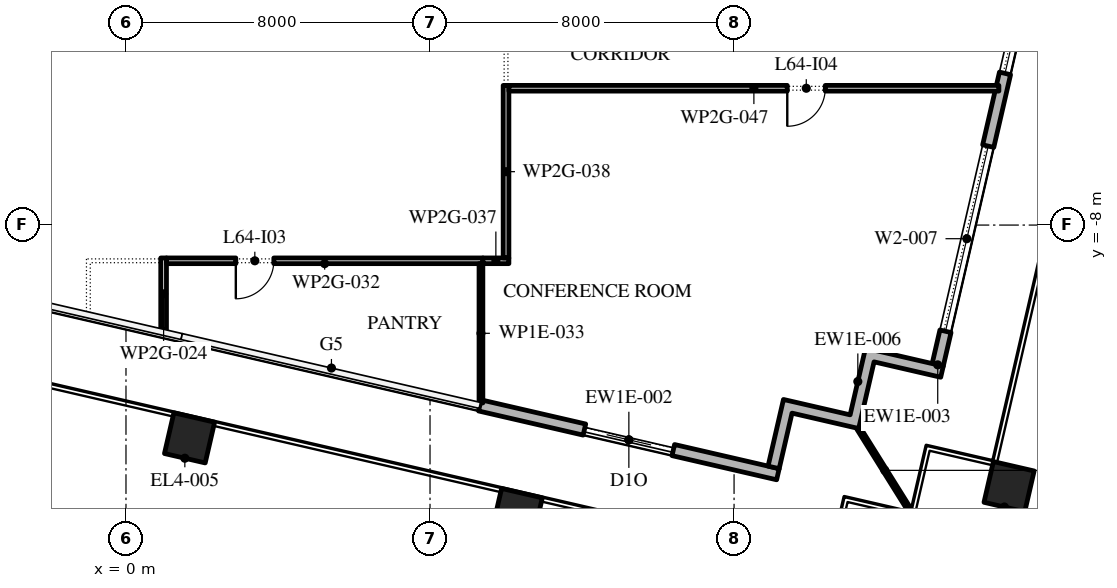
"""IFC4 building model, lengths in metres.
Left out: names, types, materials, properties, quantities, classifications, styles, units other than length and angle.
Written with IfcOpenShell. Run it as: python <this file> out.ifc"""

import sys

from ifc_helpers import new_model, si_unit, direction, frame, frame_2d, origin, origin_2d, place, context, subcontext, project, spatial, polyline, rectangle, outline, extrude, element, fill, save


model = new_model("IFC4")
c1 = context("Model", 3, precision=1e-05, world=origin(), true_north=direction((0.0, 1.0)))
c2 = subcontext(c1, "Body", "Model", "MODEL_VIEW")
j1 = project(units=[si_unit("LENGTHUNIT", "METRE"), si_unit("PLANEANGLEUNIT", "RADIAN")], contexts=[c1])
p1 = place(None, origin())
s1 = spatial("IfcSite", under=j1, at=p1, CompositionType="ELEMENT")
p2 = place(p1, origin())
s2 = spatial("IfcBuilding", under=s1, at=p2, CompositionType="ELEMENT")
p3 = place(p2, frame((0.0, 0.0, 293.4)))
s3 = spatial("IfcBuildingStorey", under=s2, at=p3, CompositionType="ELEMENT", Elevation=293.4)
for number, where, z_axis, x_axis in (
    (1, (1.672, -13.599, 0.0), (0.0, 0.0, 1.0), (0.974, -0.225, 0.0)),
    (2, (10.295, -15.59, 0.0), (0.0, 0.0, 1.0), (0.974, -0.225, 0.0)),
    (3, (23.236, -14.883, 0.0), (0.0, 0.0, 1.0), (0.974, -0.225, 0.0)),
):
    element("IfcColumn", number, at=place(p3, frame(where, z_axis=z_axis, x_axis=x_axis)), inside=s3, PredefinedType="COLUMN", context=c2, shape_type="SweptSolid", body=[
        extrude(rectangle(XDim=1.1, YDim=1.1, at=origin_2d()), origin(), (0.0, 0.0, 1.0), 4.2),
    ])
p4 = place(p3, frame((9.31, -12.745, 0.0), z_axis=(0.0, 0.0, 1.0), x_axis=(0.974372279954, -0.224941459176, 0.0)))
e4 = element("IfcWall", 4, at=p4, inside=s3, PredefinedType="STANDARD", context=c2, shape_type="SweptSolid", body=[
    extrude(rectangle(XDim=8.05, YDim=0.3, at=frame_2d((4.025, 0.0))), origin(), (0.0, 0.0, 1.0), 3.75),
])
p5 = place(p4, frame((2.825, 0.0, 0.0)))
e5 = element("IfcOpeningElement", 5, at=p5, cuts=e4, PredefinedType="OPENING", context=c2, shape_type="SweptSolid", body=[
    extrude(rectangle(XDim=2.4, YDim=2.95, at=frame_2d((1.2, 1.475))), frame((0.0, 0.16, 0.0), z_axis=(0.0, -1.0, 0.0), x_axis=(1.0, 0.0, 0.0)), (0.0, 0.0, 1.0), 0.32),
])
p6 = place(p3, frame((21.359, -11.678, 0.0), z_axis=(0.0, 0.0, 1.0), x_axis=(0.224949198343, 0.974370493275, 0.0)))
e6 = element("IfcWall", 6, at=p6, inside=s3, PredefinedType="STANDARD", context=c2, shape_type="SweptSolid", body=[
    extrude(rectangle(XDim=49.5, YDim=0.3, at=frame_2d((24.75, 0.0))), origin(), (0.0, 0.0, 1.0), 3.75),
])
p7 = place(p6, frame((0.907, 0.0, 0.45)))
e7 = element("IfcOpeningElement", 7, at=p7, cuts=e6, PredefinedType="OPENING", context=c2, shape_type="SweptSolid", body=[
    extrude(rectangle(XDim=5.0, YDim=3.25, at=frame_2d((2.5, 1.625))), frame((0.0, 0.16, 0.0), z_axis=(0.0, -1.0, 0.0), x_axis=(1.0, 0.0, 0.0)), (0.0, 0.0, 1.0), 0.32),
])
p8 = place(p6, frame((7.871, 0.0, 0.45)))
e8 = element("IfcOpeningElement", 8, at=p8, cuts=e6, PredefinedType="OPENING", context=c2, shape_type="SweptSolid", body=[
    extrude(rectangle(XDim=5.0, YDim=2.85, at=frame_2d((2.5, 1.425))), frame((0.0, 0.16, 0.0), z_axis=(0.0, -1.0, 0.0), x_axis=(1.0, 0.0, 0.0)), (0.0, 0.0, 1.0), 0.32),
])
p9 = place(p6, frame((14.986, 0.0, 0.45)))
e9 = element("IfcOpeningElement", 9, at=p9, cuts=e6, PredefinedType="OPENING", context=c2, shape_type="SweptSolid", body=[
    extrude(rectangle(XDim=5.0, YDim=2.85, at=frame_2d((2.5, 1.425))), frame((0.0, 0.16, 0.0), z_axis=(0.0, -1.0, 0.0), x_axis=(1.0, 0.0, 0.0)), (0.0, 0.0, 1.0), 0.32),
])
p10 = place(p6, frame((22.1, 0.0, 0.45)))
e10 = element("IfcOpeningElement", 10, at=p10, cuts=e6, PredefinedType="OPENING", context=c2, shape_type="SweptSolid", body=[
    extrude(rectangle(XDim=5.0, YDim=2.8, at=frame_2d((2.5, 1.4))), frame((0.0, 0.16, 0.0), z_axis=(0.0, -1.0, 0.0), x_axis=(1.0, 0.0, 0.0)), (0.0, 0.0, 1.0), 0.32),
])
p11 = place(p6, frame((29.214, 0.0, 0.45)))
e11 = element("IfcOpeningElement", 11, at=p11, cuts=e6, PredefinedType="OPENING", context=c2, shape_type="SweptSolid", body=[
    extrude(rectangle(XDim=5.0, YDim=2.7, at=frame_2d((2.5, 1.35))), frame((0.0, 0.16, 0.0), z_axis=(0.0, -1.0, 0.0), x_axis=(1.0, 0.0, 0.0)), (0.0, 0.0, 1.0), 0.32),
])
p12 = place(p6, frame((37.628, 0.0, 0.0)))
e12 = element("IfcOpeningElement", 12, at=p12, cuts=e6, PredefinedType="OPENING", context=c2, shape_type="SweptSolid", body=[
    extrude(rectangle(XDim=2.4, YDim=2.65, at=frame_2d((1.2, 1.325))), frame((0.0, 0.16, 0.0), z_axis=(0.0, -1.0, 0.0), x_axis=(1.0, 0.0, 0.0)), (0.0, 0.0, 1.0), 0.32),
])
p13 = place(p6, frame((43.443, 0.0, 0.45)))
e13 = element("IfcOpeningElement", 13, at=p13, cuts=e6, PredefinedType="OPENING", context=c2, shape_type="SweptSolid", body=[
    extrude(rectangle(XDim=5.0, YDim=3.25, at=frame_2d((2.5, 1.625))), frame((0.0, 0.16, 0.0), z_axis=(0.0, -1.0, 0.0), x_axis=(1.0, 0.0, 0.0)), (0.0, 0.0, 1.0), 0.32),
])
p14 = place(p3, origin())
e14 = element("IfcWall", 14, at=p14, inside=s3, PredefinedType="STANDARD", context=c2, shape_type="SweptSolid", body=[
    extrude(outline(polyline([(19.054, -12.993), (19.459, -11.24), (21.505, -11.712), (21.438, -12.004), (19.684, -11.599), (19.279, -13.353), (17.525, -12.948), (17.188, -14.41), (16.895, -14.342), (17.3, -12.588), (19.054, -12.993)])), origin(), (0.0, 0.0, 1.0), 3.75),
])
p15 = place(p3, frame((19.279, -13.353, -0.05), z_axis=(0.0, 0.0, 1.0), x_axis=(0.529914407191, -0.848051131154, 0.0)))
e15 = element("IfcWall", 15, at=p15, inside=s3, PredefinedType="STANDARD", context=c2, shape_type="SweptSolid", body=[
    extrude(rectangle(XDim=2.596, YDim=0.1, at=frame_2d((1.298, 0.0))), origin(), (0.0, 0.0, 1.0), 3.8),
])
p16 = place(p3, frame((0.99, -8.865, 0.0), z_axis=(0.0, 0.0, 1.0), x_axis=(0.0, -1.0, 0.0)))
e16 = element("IfcWall", 16, at=p16, inside=s3, PredefinedType="PARTITIONING", context=c2, shape_type="SweptSolid", body=[
    extrude(rectangle(XDim=1.888, YDim=0.15, at=frame_2d((0.944, 0.0))), origin(), (0.0, 0.0, 1.0), 3.75),
])
p17 = place(p3, frame((9.39, -8.94, 0.0), z_axis=(0.0, 0.0, 1.0), x_axis=(-1.0, 0.0, 0.0)))
e17 = element("IfcWall", 17, at=p17, inside=s3, PredefinedType="PARTITIONING", context=c2, shape_type="SweptSolid", body=[
    extrude(rectangle(XDim=8.325, YDim=0.15, at=frame_2d((4.163, 0.0))), origin(), (0.0, 0.0, 1.0), 3.75),
])
p18 = place(p17, frame((5.5, 0.0, 0.0)))
e18 = element("IfcOpeningElement", 18, at=p18, cuts=e17, PredefinedType="OPENING", context=c2, shape_type="SweptSolid", body=[
    extrude(rectangle(XDim=1.0, YDim=2.1, at=frame_2d((0.5, 1.05))), frame((0.0, 0.085, 0.0), z_axis=(0.0, -1.0, 0.0), x_axis=(1.0, 0.0, 0.0)), (0.0, 0.0, 1.0), 0.17),
])
p19 = place(p3, frame((9.34, -9.015, 0.0), z_axis=(0.0, 0.0, 1.0), x_axis=(0.0, -1.0, 0.0)))
e19 = element("IfcWall", 19, at=p19, inside=s3, PredefinedType="PARTITIONING", context=c2, shape_type="SweptSolid", body=[
    extrude(rectangle(XDim=3.666, YDim=0.1, at=frame_2d((1.833, 0.0))), origin(), (0.0, 0.0, 1.0), 3.75),
])
p20 = place(p3, frame((10.075, -8.94, 0.0), z_axis=(0.0, 0.0, 1.0), x_axis=(-1.0, 0.0, 0.0)))
e20 = element("IfcWall", 20, at=p20, inside=s3, PredefinedType="PARTITIONING", context=c2, shape_type="SweptSolid", body=[
    extrude(rectangle(XDim=0.685, YDim=0.15, at=frame_2d((0.343, 0.0))), origin(), (0.0, 0.0, 1.0), 3.75),
])
p21 = place(p3, frame((10.0, -4.325, 0.0), z_axis=(0.0, 0.0, 1.0), x_axis=(0.0, -1.0, 0.0)))
e21 = element("IfcWall", 21, at=p21, inside=s3, PredefinedType="PARTITIONING", context=c2, shape_type="SweptSolid", body=[
    extrude(rectangle(XDim=4.54, YDim=0.15, at=frame_2d((2.27, 0.0))), origin(), (0.0, 0.0, 1.0), 3.75),
])
p22 = place(p3, frame((22.968, -4.4, 0.0), z_axis=(0.0, 0.0, 1.0), x_axis=(-1.0, 0.0, 0.0)))
e22 = element("IfcWall", 22, at=p22, inside=s3, PredefinedType="PARTITIONING", context=c2, shape_type="SweptSolid", body=[
    extrude(rectangle(XDim=12.893, YDim=0.15, at=frame_2d((6.447, 0.0))), origin(), (0.0, 0.0, 1.0), 3.75),
])
p23 = place(p22, frame((4.568, 0.0, 0.0)))
e23 = element("IfcOpeningElement", 23, at=p23, cuts=e22, PredefinedType="OPENING", context=c2, shape_type="SweptSolid", body=[
    extrude(rectangle(XDim=1.0, YDim=2.1, at=frame_2d((0.5, 1.05))), frame((0.0, 0.085, 0.0), z_axis=(0.0, -1.0, 0.0), x_axis=(1.0, 0.0, 0.0)), (0.0, 0.0, 1.0), 0.17),
])
p24 = place(p5, origin())
e24 = element("IfcDoor", 24, at=p24, inside=s3, OperationType="DOUBLE_DOOR_SLIDING", PredefinedType="DOOR", context=c2, shape_type="SweptSolid", body=[
    extrude(rectangle(XDim=2.4, YDim=2.95, at=frame_2d((1.2, 1.475))), frame((0.0, 0.025, 0.0), z_axis=(0.0, -1.0, 0.0), x_axis=(1.0, 0.0, 0.0)), (0.0, 0.0, 1.0), 0.05),
])
fill(e5, e24)
p25 = place(p7, origin())
e25 = element("IfcWindow", 25, at=p25, inside=s3, PartitioningType="DOUBLE_PANEL_VERTICAL", PredefinedType="WINDOW", context=c2, shape_type="SweptSolid", body=[
    extrude(rectangle(XDim=5.0, YDim=3.25, at=frame_2d((2.5, 1.625))), frame((0.0, 0.03, 0.0), z_axis=(0.0, -1.0, 0.0), x_axis=(1.0, 0.0, 0.0)), (0.0, 0.0, 1.0), 0.06),
])
fill(e7, e25)
p26 = place(p8, origin())
e26 = element("IfcWindow", 26, at=p26, inside=s3, PartitioningType="DOUBLE_PANEL_VERTICAL", PredefinedType="WINDOW", context=c2, shape_type="SweptSolid", body=[
    extrude(rectangle(XDim=5.0, YDim=2.85, at=frame_2d((2.5, 1.425))), frame((0.0, 0.03, 0.0), z_axis=(0.0, -1.0, 0.0), x_axis=(1.0, 0.0, 0.0)), (0.0, 0.0, 1.0), 0.06),
])
fill(e8, e26)
p27 = place(p18, origin())
e27 = element("IfcDoor", 27, at=p27, inside=s3, OperationType="SINGLE_SWING_LEFT", PredefinedType="DOOR", context=c2, shape_type="SweptSolid", body=[
    extrude(rectangle(XDim=1.0, YDim=2.1, at=frame_2d((0.5, 1.05))), frame((0.0, 0.025, 0.0), z_axis=(0.0, -1.0, 0.0), x_axis=(1.0, 0.0, 0.0)), (0.0, 0.0, 1.0), 0.05),
])
fill(e18, e27)
p28 = place(p23, origin())
e28 = element("IfcDoor", 28, at=p28, inside=s3, OperationType="SINGLE_SWING_LEFT", PredefinedType="DOOR", context=c2, shape_type="SweptSolid", body=[
    extrude(rectangle(XDim=1.0, YDim=2.1, at=frame_2d((0.5, 1.05))), frame((0.0, 0.025, 0.0), z_axis=(0.0, -1.0, 0.0), x_axis=(1.0, 0.0, 0.0)), (0.0, 0.0, 1.0), 0.05),
])
fill(e23, e28)
save(model, sys.argv[1])
